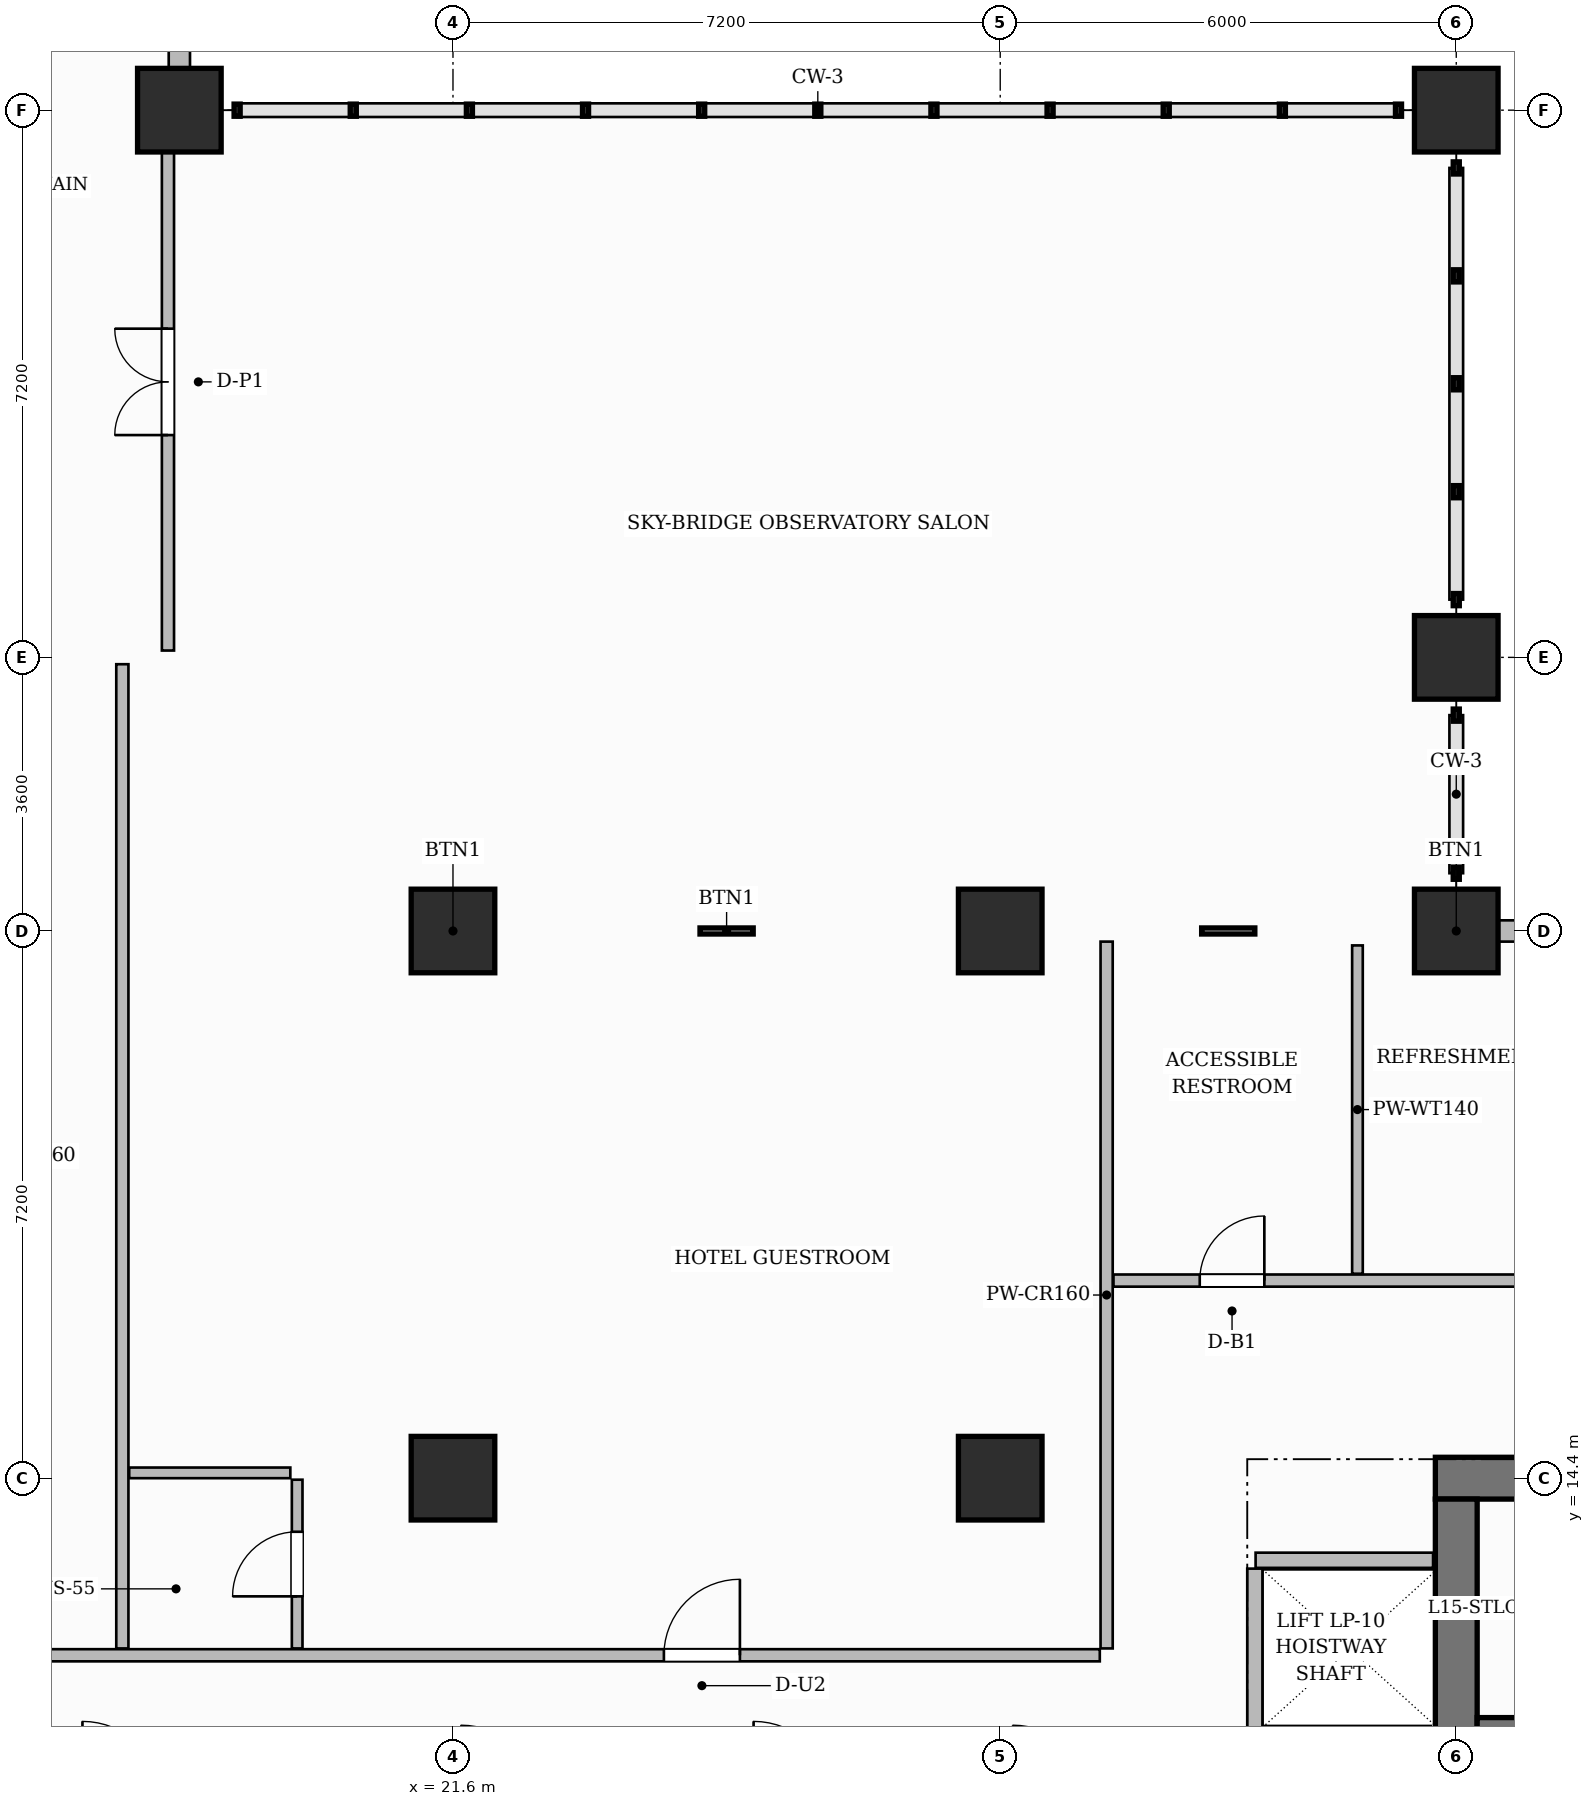
"""IFC4 building model, lengths in metres.
Left out: names, types, materials, properties, quantities, classifications, styles, units other than length and angle.
Written with IfcOpenShell. Run it as: python <this file> out.ifc"""

import sys

from ifc_helpers import new_model, si_unit, direction, frame, frame_2d, origin, origin_2d, place, context, subcontext, project, spatial, rectangle, extrude, source, transform, mapped, element, fill, save


model = new_model("IFC4")
c1 = context("Model", 3, precision=1e-05, world=origin(), true_north=direction((0.0, 1.0)))
c2 = subcontext(c1, "Body", "Model", "MODEL_VIEW")
j1 = project(units=[si_unit("LENGTHUNIT", "METRE"), si_unit("PLANEANGLEUNIT", "RADIAN")], contexts=[c1])
p1 = place(None, origin())
s1 = spatial("IfcSite", under=j1, at=p1, CompositionType="ELEMENT")
p2 = place(p1, origin())
s2 = spatial("IfcBuilding", under=s1, at=p2, CompositionType="ELEMENT")
p3 = place(p2, frame((0.0, 0.0, 65.7)))
s3 = spatial("IfcBuildingStorey", under=s2, at=p3, CompositionType="ELEMENT", Elevation=65.7)
p4 = place(p3, frame((34.525, 14.4, 0.0), z_axis=(0.0, 0.0, 1.0), x_axis=(1.0, 0.0, 0.0)))
e1 = element("IfcWall", 1, at=p4, inside=s3, PredefinedType="SHEAR", context=c2, shape_type="SweptSolid", body=[
    extrude(rectangle(XDim=15.55, YDim=0.55, at=frame_2d((7.775, 0.0))), origin(), (0.0, 0.0, 1.0), 3.7),
])
p5 = place(p4, frame((5.405, 0.0, 0.0)))
e2 = element("IfcOpeningElement", 2, at=p5, cuts=e1, PredefinedType="OPENING", context=c2, shape_type="SweptSolid", body=[
    extrude(rectangle(XDim=1.5, YDim=2.2, at=frame_2d((0.75, 1.1))), frame((0.0, 0.285, 0.0), z_axis=(0.0, -1.0, 0.0), x_axis=(1.0, 0.0, 0.0)), (0.0, 0.0, 1.0), 0.57),
])
p6 = place(p4, frame((1.62, 0.0, 0.0)))
e3 = element("IfcOpeningElement", 3, at=p6, cuts=e1, PredefinedType="OPENING", context=c2, shape_type="SweptSolid", body=[
    extrude(rectangle(XDim=1.05, YDim=2.15, at=frame_2d((0.525, 1.075))), frame((0.0, 0.285, 0.0), z_axis=(0.0, -1.0, 0.0), x_axis=(1.0, 0.0, 0.0)), (0.0, 0.0, 1.0), 0.57),
])
p7 = place(p4, frame((11.25, 0.0, 0.0)))
e4 = element("IfcOpeningElement", 4, at=p7, cuts=e1, PredefinedType="OPENING", context=c2, shape_type="SweptSolid", body=[
    extrude(rectangle(XDim=1.05, YDim=2.15, at=frame_2d((0.525, 1.075))), frame((0.0, 0.285, 0.0), z_axis=(0.0, -1.0, 0.0), x_axis=(1.0, 0.0, 0.0)), (0.0, 0.0, 1.0), 0.57),
])
p8 = place(p3, frame((34.8, 3.875, 0.0), z_axis=(0.0, 0.0, 1.0), x_axis=(0.0, 1.0, 0.0)))
e5 = element("IfcWall", 5, at=p8, inside=s3, PredefinedType="SHEAR", context=c2, shape_type="SweptSolid", body=[
    extrude(rectangle(XDim=10.25, YDim=0.55, at=frame_2d((5.125, 0.0))), origin(), (0.0, 0.0, 1.0), 3.7),
])
m1 = source(origin(), c2, "Body", "SweptSolid", [
    extrude(rectangle(XDim=1.1, YDim=1.1, at=origin_2d()), origin(), (0.0, 0.0, 1.0), 3.7),
])
for number, where, z_axis, x_axis in (
    (6, (21.6, 14.4, 0.0), (0.0, 0.0, 1.0), (1.0, 0.0, 0.0)),
    (7, (21.6, 21.6, 0.0), (0.0, 0.0, 1.0), (1.0, 0.0, 0.0)),
    (8, (28.8, 14.4, 0.0), (0.0, 0.0, 1.0), (1.0, 0.0, 0.0)),
    (9, (28.8, 21.6, 0.0), (0.0, 0.0, 1.0), (1.0, 0.0, 0.0)),
    (10, (34.8, 21.6, 0.0), (0.0, 0.0, 1.0), (1.0, 0.0, 0.0)),
    (11, (34.8, 25.2, 0.0), (0.0, 0.0, 1.0), (1.0, 0.0, 0.0)),
    (12, (34.8, 32.4, 0.0), (0.0, 0.0, 1.0), (1.0, 0.0, 0.0)),
    (13, (18.0, 32.4, 0.0), (0.0, 0.0, 1.0), (1.0, 0.0, 0.0)),
):
    element("IfcColumn", number, at=place(p3, frame(where, z_axis=z_axis, x_axis=x_axis)), inside=s3, PredefinedType="COLUMN", context=c2, shape_type="MappedRepresentation", body=[
        mapped(m1, transform((0.0, 0.0, 0.0), scale=1.0)),
    ])
p9 = place(p3, frame((35.075, 11.15, 0.0), z_axis=(0.0, 0.0, 1.0), x_axis=(1.0, 0.0, 0.0)))
e14 = element("IfcWall", 14, at=p9, inside=s3, PredefinedType="SHEAR", context=c2, shape_type="SweptSolid", body=[
    extrude(rectangle(XDim=3.165, YDim=0.2, at=frame_2d((1.583, 0.0))), origin(), (0.0, 0.0, 1.0), 3.7),
])
p10 = place(p9, frame((1.07, 0.0, 0.0)))
e15 = element("IfcOpeningElement", 15, at=p10, cuts=e14, PredefinedType="OPENING", context=c2, shape_type="SweptSolid", body=[
    extrude(rectangle(XDim=1.05, YDim=2.2, at=frame_2d((0.525, 1.1))), frame((0.0, 0.11, 0.0), z_axis=(0.0, -1.0, 0.0), x_axis=(1.0, 0.0, 0.0)), (0.0, 0.0, 1.0), 0.22),
])
p11 = place(p3, frame((32.16, 13.32, 0.0), z_axis=(0.0, 0.0, 1.0), x_axis=(1.0, 0.0, 0.0)))
e16 = element("IfcWall", 16, at=p11, inside=s3, PredefinedType="PARTITIONING", context=c2, shape_type="SweptSolid", body=[
    extrude(rectangle(XDim=2.335, YDim=0.2, at=frame_2d((1.167, 0.0))), origin(), (0.0, 0.0, 1.0), 3.45),
])
p12 = place(p3, frame((32.15, 4.39, 0.0), z_axis=(0.0, 0.0, 1.0), x_axis=(0.0, 1.0, 0.0)))
e17 = element("IfcWall", 17, at=p12, inside=s3, PredefinedType="PARTITIONING", context=c2, shape_type="SweptSolid", body=[
    extrude(rectangle(XDim=8.82, YDim=0.2, at=frame_2d((4.41, 0.0))), origin(), (0.0, 0.0, 1.0), 3.45),
])
p13 = place(p3, frame((14.548, 12.07, 0.0), z_axis=(0.0, 0.0, 1.0), x_axis=(1.0, 0.0, 0.0)))
e18 = element("IfcWall", 18, at=p13, inside=s3, PredefinedType="PARTITIONING", context=c2, shape_type="SweptSolid", body=[
    extrude(rectangle(XDim=15.562, YDim=0.16, at=frame_2d((7.781, 0.0))), origin(), (0.0, 0.0, 1.0), 3.45),
])
p14 = place(p13, frame((9.827, 0.0, 0.0)))
e19 = element("IfcOpeningElement", 19, at=p14, cuts=e18, PredefinedType="OPENING", context=c2, shape_type="SweptSolid", body=[
    extrude(rectangle(XDim=1.0, YDim=2.2, at=frame_2d((0.5, 1.1))), frame((0.0, 0.09, 0.0), z_axis=(0.0, -1.0, 0.0), x_axis=(1.0, 0.0, 0.0)), (0.0, 0.0, 1.0), 0.18),
])
p15 = place(p3, frame((30.2, 12.16, 0.0), z_axis=(0.0, 0.0, 1.0), x_axis=(0.0, 1.0, 0.0)))
e20 = element("IfcWall", 20, at=p15, inside=s3, PredefinedType="PARTITIONING", context=c2, shape_type="SweptSolid", body=[
    extrude(rectangle(XDim=9.3, YDim=0.16, at=frame_2d((4.65, 0.0))), origin(), (0.0, 0.0, 1.0), 3.45),
])
p16 = place(p3, frame((30.29, 17.0, 0.0), z_axis=(0.0, 0.0, 1.0), x_axis=(1.0, 0.0, 0.0)))
e21 = element("IfcWall", 21, at=p16, inside=s3, PredefinedType="PARTITIONING", context=c2, shape_type="SweptSolid", body=[
    extrude(rectangle(XDim=19.37, YDim=0.16, at=frame_2d((9.685, 0.0))), origin(), (0.0, 0.0, 1.0), 3.45),
])
p17 = place(p16, frame((1.135, 0.0, 0.0)))
e22 = element("IfcOpeningElement", 22, at=p17, cuts=e21, PredefinedType="OPENING", context=c2, shape_type="SweptSolid", body=[
    extrude(rectangle(XDim=0.85, YDim=2.1, at=frame_2d((0.425, 1.05))), frame((0.0, 0.09, 0.0), z_axis=(0.0, -1.0, 0.0), x_axis=(1.0, 0.0, 0.0)), (0.0, 0.0, 1.0), 0.18),
])
p18 = place(p16, frame((5.71, 0.0, 0.0)))
e23 = element("IfcOpeningElement", 23, at=p18, cuts=e21, PredefinedType="OPENING", context=c2, shape_type="SweptSolid", body=[
    extrude(rectangle(XDim=0.9, YDim=2.15, at=frame_2d((0.45, 1.075))), frame((0.0, 0.09, 0.0), z_axis=(0.0, -1.0, 0.0), x_axis=(1.0, 0.0, 0.0)), (0.0, 0.0, 1.0), 0.18),
])
p19 = place(p16, frame((10.635, 0.0, 0.0)))
e24 = element("IfcOpeningElement", 24, at=p19, cuts=e21, PredefinedType="OPENING", context=c2, shape_type="SweptSolid", body=[
    extrude(rectangle(XDim=0.95, YDim=2.15, at=frame_2d((0.475, 1.075))), frame((0.0, 0.09, 0.0), z_axis=(0.0, -1.0, 0.0), x_axis=(1.0, 0.0, 0.0)), (0.0, 0.0, 1.0), 0.18),
])
p20 = place(p16, frame((16.235, 0.0, 0.0)))
e25 = element("IfcOpeningElement", 25, at=p20, cuts=e21, PredefinedType="OPENING", context=c2, shape_type="SweptSolid", body=[
    extrude(rectangle(XDim=0.95, YDim=2.15, at=frame_2d((0.475, 1.075))), frame((0.0, 0.09, 0.0), z_axis=(0.0, -1.0, 0.0), x_axis=(1.0, 0.0, 0.0)), (0.0, 0.0, 1.0), 0.18),
])
p21 = place(p3, frame((33.5, 17.09, 0.0), z_axis=(0.0, 0.0, 1.0), x_axis=(0.0, 1.0, 0.0)))
e26 = element("IfcWall", 26, at=p21, inside=s3, PredefinedType="PARTITIONING", context=c2, shape_type="SweptSolid", body=[
    extrude(rectangle(XDim=4.32, YDim=0.14, at=frame_2d((2.16, 0.0))), origin(), (0.0, 0.0, 1.0), 3.45),
])
p22 = place(p3, frame((17.25, 12.16, 0.0), z_axis=(0.0, 0.0, 1.0), x_axis=(0.0, 1.0, 0.0)))
e27 = element("IfcWall", 27, at=p22, inside=s3, PredefinedType="PARTITIONING", context=c2, shape_type="SweptSolid", body=[
    extrude(rectangle(XDim=12.95, YDim=0.16, at=frame_2d((6.475, 0.0))), origin(), (0.0, 0.0, 1.0), 3.45),
])
p23 = place(p3, frame((19.55, 12.16, 0.0), z_axis=(0.0, 0.0, 1.0), x_axis=(0.0, 1.0, 0.0)))
e28 = element("IfcWall", 28, at=p23, inside=s3, PredefinedType="PARTITIONING", context=c2, shape_type="SweptSolid", body=[
    extrude(rectangle(XDim=2.22, YDim=0.14, at=frame_2d((1.11, 0.0))), origin(), (0.0, 0.0, 1.0), 3.45),
])
p24 = place(p23, frame((0.685, 0.0, 0.0)))
e29 = element("IfcOpeningElement", 29, at=p24, cuts=e28, PredefinedType="OPENING", context=c2, shape_type="SweptSolid", body=[
    extrude(rectangle(XDim=0.85, YDim=2.1, at=frame_2d((0.425, 1.05))), frame((0.0, 0.08, 0.0), z_axis=(0.0, -1.0, 0.0), x_axis=(1.0, 0.0, 0.0)), (0.0, 0.0, 1.0), 0.16),
])
p25 = place(p3, frame((17.34, 14.47, 0.0), z_axis=(0.0, 0.0, 1.0), x_axis=(1.0, 0.0, 0.0)))
e30 = element("IfcWall", 30, at=p25, inside=s3, PredefinedType="PARTITIONING", context=c2, shape_type="SweptSolid", body=[
    extrude(rectangle(XDim=2.12, YDim=0.14, at=frame_2d((1.06, 0.0))), origin(), (0.0, 0.0, 1.0), 2.885),
])
p26 = place(p3, frame((17.85, 25.29, 0.0), z_axis=(0.0, 0.0, 1.0), x_axis=(0.0, 1.0, 0.0)))
e31 = element("IfcWall", 31, at=p26, inside=s3, PredefinedType="PARTITIONING", context=c2, shape_type="SweptSolid", body=[
    extrude(rectangle(XDim=6.92, YDim=0.16, at=frame_2d((3.46, 0.0))), origin(), (0.0, 0.0, 1.0), 3.45),
])
p27 = place(p26, frame((2.835, 0.0, 0.0)))
e32 = element("IfcOpeningElement", 32, at=p27, cuts=e31, PredefinedType="OPENING", context=c2, shape_type="SweptSolid", body=[
    extrude(rectangle(XDim=1.4, YDim=2.35, at=frame_2d((0.7, 1.175))), frame((0.0, 0.09, 0.0), z_axis=(0.0, -1.0, 0.0), x_axis=(1.0, 0.0, 0.0)), (0.0, 0.0, 1.0), 0.18),
])
p28 = place(p3, frame((34.8, 21.6, 0.0), z_axis=(0.0, 0.0, 1.0), x_axis=(1.0, 0.0, 0.0)))
e33 = element("IfcWall", 33, at=p28, inside=s3, PredefinedType="SOLIDWALL", context=c2, shape_type="SweptSolid", body=[
    extrude(rectangle(XDim=22.8, YDim=0.28, at=frame_2d((11.4, 0.0))), origin(), (0.0, 0.0, 1.0), 2.885),
])
p29 = place(p28, frame((1.796, 0.0, 0.8)))
e34 = element("IfcOpeningElement", 34, at=p29, cuts=e33, PredefinedType="OPENING", context=c2, shape_type="SweptSolid", body=[
    extrude(rectangle(XDim=1.8, YDim=1.85, at=frame_2d((0.9, 0.925))), frame((0.0, 0.15, 0.0), z_axis=(0.0, -1.0, 0.0), x_axis=(1.0, 0.0, 0.0)), (0.0, 0.0, 1.0), 0.3),
])
p30 = place(p28, frame((4.929, 0.0, 0.8)))
e35 = element("IfcOpeningElement", 35, at=p30, cuts=e33, PredefinedType="OPENING", context=c2, shape_type="SweptSolid", body=[
    extrude(rectangle(XDim=1.15, YDim=1.8, at=frame_2d((0.575, 0.9))), frame((0.0, 0.15, 0.0), z_axis=(0.0, -1.0, 0.0), x_axis=(1.0, 0.0, 0.0)), (0.0, 0.0, 1.0), 0.3),
])
p31 = place(p28, frame((8.321, 0.0, 0.8)))
e36 = element("IfcOpeningElement", 36, at=p31, cuts=e33, PredefinedType="OPENING", context=c2, shape_type="SweptSolid", body=[
    extrude(rectangle(XDim=0.95, YDim=1.75, at=frame_2d((0.475, 0.875))), frame((0.0, 0.15, 0.0), z_axis=(0.0, -1.0, 0.0), x_axis=(1.0, 0.0, 0.0)), (0.0, 0.0, 1.0), 0.3),
])
p32 = place(p28, frame((11.004, 0.0, 0.8)))
e37 = element("IfcOpeningElement", 37, at=p32, cuts=e33, PredefinedType="OPENING", context=c2, shape_type="SweptSolid", body=[
    extrude(rectangle(XDim=1.8, YDim=1.85, at=frame_2d((0.9, 0.925))), frame((0.0, 0.15, 0.0), z_axis=(0.0, -1.0, 0.0), x_axis=(1.0, 0.0, 0.0)), (0.0, 0.0, 1.0), 0.3),
])
p33 = place(p28, frame((16.475, 0.0, 0.8)))
e38 = element("IfcOpeningElement", 38, at=p33, cuts=e33, PredefinedType="OPENING", context=c2, shape_type="SweptSolid", body=[
    extrude(rectangle(XDim=1.8, YDim=1.85, at=frame_2d((0.9, 0.925))), frame((0.0, 0.15, 0.0), z_axis=(0.0, -1.0, 0.0), x_axis=(1.0, 0.0, 0.0)), (0.0, 0.0, 1.0), 0.3),
])
p34 = place(p28, frame((19.525, 0.0, 0.8)))
e39 = element("IfcOpeningElement", 39, at=p34, cuts=e33, PredefinedType="OPENING", context=c2, shape_type="SweptSolid", body=[
    extrude(rectangle(XDim=1.8, YDim=1.85, at=frame_2d((0.9, 0.925))), frame((0.0, 0.15, 0.0), z_axis=(0.0, -1.0, 0.0), x_axis=(1.0, 0.0, 0.0)), (0.0, 0.0, 1.0), 0.3),
])
p35 = place(p3, frame((18.0, 32.4, 0.0), z_axis=(0.0, 0.0, 1.0), x_axis=(0.0, 1.0, 0.0)))
e40 = element("IfcWall", 40, at=p35, inside=s3, PredefinedType="SOLIDWALL", context=c2, shape_type="SweptSolid", body=[
    extrude(rectangle(XDim=14.35, YDim=0.28, at=frame_2d((7.175, 0.0))), origin(), (0.0, 0.0, 1.0), 3.45),
])
p36 = place(p35, frame((1.5, 0.0, 0.0)))
e41 = element("IfcOpeningElement", 41, at=p36, cuts=e40, PredefinedType="OPENING", context=c2, shape_type="SweptSolid", body=[
    extrude(rectangle(XDim=1.2, YDim=2.2, at=frame_2d((0.6, 1.1))), frame((0.0, 0.15, 0.0), z_axis=(0.0, -1.0, 0.0), x_axis=(1.0, 0.0, 0.0)), (0.0, 0.0, 1.0), 0.3),
])
p37 = place(p35, frame((3.8, 0.0, 0.8)))
e42 = element("IfcOpeningElement", 42, at=p37, cuts=e40, PredefinedType="OPENING", context=c2, shape_type="SweptSolid", body=[
    extrude(rectangle(XDim=1.8, YDim=1.85, at=frame_2d((0.9, 0.925))), frame((0.0, 0.15, 0.0), z_axis=(0.0, -1.0, 0.0), x_axis=(1.0, 0.0, 0.0)), (0.0, 0.0, 1.0), 0.3),
])
p38 = place(p35, frame((8.525, 0.0, 0.8)))
e43 = element("IfcOpeningElement", 43, at=p38, cuts=e40, PredefinedType="OPENING", context=c2, shape_type="SweptSolid", body=[
    extrude(rectangle(XDim=1.8, YDim=1.85, at=frame_2d((0.9, 0.925))), frame((0.0, 0.15, 0.0), z_axis=(0.0, -1.0, 0.0), x_axis=(1.0, 0.0, 0.0)), (0.0, 0.0, 1.0), 0.3),
])
p39 = place(p35, frame((11.275, 0.0, 0.8)))
e44 = element("IfcOpeningElement", 44, at=p39, cuts=e40, PredefinedType="OPENING", context=c2, shape_type="SweptSolid", body=[
    extrude(rectangle(XDim=1.8, YDim=1.85, at=frame_2d((0.9, 0.925))), frame((0.0, 0.15, 0.0), z_axis=(0.0, -1.0, 0.0), x_axis=(1.0, 0.0, 0.0)), (0.0, 0.0, 1.0), 0.3),
])
m2 = source(origin(), c2, "Body", "SweptSolid", [
    extrude(rectangle(XDim=0.85, YDim=2.1, at=frame_2d((0.425, 1.05))), frame((0.0, 0.025, 0.0), z_axis=(0.0, -1.0, 0.0), x_axis=(1.0, 0.0, 0.0)), (0.0, 0.0, 1.0), 0.05),
])
p40 = place(p17, origin())
e45 = element("IfcDoor", 45, at=p40, inside=s3, OperationType="SINGLE_SWING_RIGHT", PredefinedType="DOOR", context=c2, shape_type="MappedRepresentation", body=[
    mapped(m2, transform((0.0, 0.0, 0.0), scale=1.0)),
])
fill(e22, e45)
p41 = place(p24, origin())
e46 = element("IfcDoor", 46, at=p41, inside=s3, OperationType="SINGLE_SWING_LEFT", PredefinedType="DOOR", context=c2, shape_type="MappedRepresentation", body=[
    mapped(m2, transform((0.0, 0.0, 0.0), scale=1.0)),
])
fill(e29, e46)
m3 = source(origin(), c2, "Body", "SweptSolid", [
    extrude(rectangle(XDim=1.0, YDim=2.2, at=frame_2d((0.5, 1.1))), frame((0.0, 0.025, 0.0), z_axis=(0.0, -1.0, 0.0), x_axis=(1.0, 0.0, 0.0)), (0.0, 0.0, 1.0), 0.05),
])
p42 = place(p14, origin())
e47 = element("IfcDoor", 47, at=p42, inside=s3, OperationType="SINGLE_SWING_RIGHT", PredefinedType="DOOR", context=c2, shape_type="MappedRepresentation", body=[
    mapped(m3, transform((0.0, 0.0, 0.0), scale=1.0)),
])
fill(e19, e47)
m4 = source(origin(), c2, "Body", "SweptSolid", [
    extrude(rectangle(XDim=1.4, YDim=2.35, at=frame_2d((0.7, 1.175))), frame((0.0, 0.025, 0.0), z_axis=(0.0, -1.0, 0.0), x_axis=(1.0, 0.0, 0.0)), (0.0, 0.0, 1.0), 0.05),
])
p43 = place(p27, origin())
e48 = element("IfcDoor", 48, at=p43, inside=s3, OperationType="DOUBLE_DOOR_SINGLE_SWING", PredefinedType="DOOR", context=c2, shape_type="MappedRepresentation", body=[
    mapped(m4, transform((0.0, 0.0, 0.0), scale=1.0)),
])
fill(e32, e48)
save(model, sys.argv[1])
